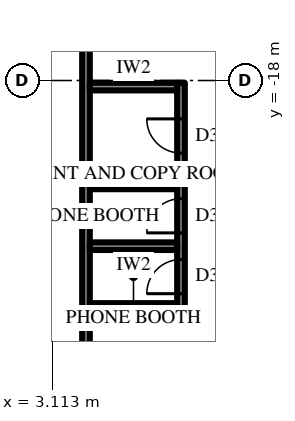
"""IFC4 building model, lengths in metres.
Left out: names, types, materials, properties, quantities, classifications, styles, units other than length and angle.
Written with IfcOpenShell. Run it as: python <this file> out.ifc"""

import sys

from ifc_helpers import new_model, si_unit, direction, frame, frame_2d, origin, place, context, subcontext, project, spatial, rectangle, extrude, element, fill, save


model = new_model("IFC4")
c1 = context("Model", 3, precision=1e-05, world=origin(), true_north=direction((0.0, 1.0)))
c2 = subcontext(c1, "Body", "Model", "MODEL_VIEW")
j1 = project(units=[si_unit("LENGTHUNIT", "METRE"), si_unit("PLANEANGLEUNIT", "RADIAN")], contexts=[c1])
p1 = place(None, origin())
s1 = spatial("IfcSite", under=j1, at=p1, CompositionType="ELEMENT")
p2 = place(p1, origin())
s2 = spatial("IfcBuilding", under=s1, at=p2, CompositionType="ELEMENT")
p3 = place(p2, frame((0.0, 0.0, 90.7)))
s3 = spatial("IfcBuildingStorey", under=s2, at=p3, CompositionType="ELEMENT", Elevation=90.7)
p4 = place(p3, frame((4.0, -14.2, 0.0), z_axis=(0.0, 0.0, 1.0), x_axis=(0.0, -1.0, 0.0)))
e1 = element("IfcWall", 1, at=p4, inside=s3, PredefinedType="PARTITIONING", context=c2, shape_type="SweptSolid", body=[
    extrude(rectangle(XDim=19.6, YDim=0.2, at=frame_2d((9.8, 0.0))), origin(), (0.0, 0.0, 1.0), 4.0),
])
p5 = place(p4, frame((1.46, 0.0, 0.0)))
e2 = element("IfcOpeningElement", 2, at=p5, cuts=e1, PredefinedType="OPENING", context=c2, shape_type="SweptSolid", body=[
    extrude(rectangle(XDim=1.0, YDim=2.2, at=frame_2d((0.5, 1.1))), frame((0.0, 0.11, 0.0), z_axis=(0.0, -1.0, 0.0), x_axis=(1.0, 0.0, 0.0)), (0.0, 0.0, 1.0), 0.22),
])
p6 = place(p3, frame((6.5, -18.06, 0.0), z_axis=(0.0, 0.0, 1.0), x_axis=(0.0, -1.0, 0.0)))
e3 = element("IfcWall", 3, at=p6, inside=s3, PredefinedType="PARTITIONING", context=c2, shape_type="SweptSolid", body=[
    extrude(rectangle(XDim=6.0, YDim=0.2, at=frame_2d((3.0, 0.0))), origin(), (0.0, 0.0, 1.0), 4.0),
])
p7 = place(p6, frame((0.95, 0.0, 0.0)))
e4 = element("IfcOpeningElement", 4, at=p7, cuts=e3, PredefinedType="OPENING", context=c2, shape_type="SweptSolid", body=[
    extrude(rectangle(XDim=0.9, YDim=2.2, at=frame_2d((0.45, 1.1))), frame((0.0, 0.11, 0.0), z_axis=(0.0, -1.0, 0.0), x_axis=(1.0, 0.0, 0.0)), (0.0, 0.0, 1.0), 0.22),
])
p8 = place(p6, frame((3.05, 0.0, 0.0)))
e5 = element("IfcOpeningElement", 5, at=p8, cuts=e3, PredefinedType="OPENING", context=c2, shape_type="SweptSolid", body=[
    extrude(rectangle(XDim=0.9, YDim=2.2, at=frame_2d((0.45, 1.1))), frame((0.0, 0.11, 0.0), z_axis=(0.0, -1.0, 0.0), x_axis=(1.0, 0.0, 0.0)), (0.0, 0.0, 1.0), 0.22),
])
p9 = place(p6, frame((4.65, 0.0, 0.0)))
e6 = element("IfcOpeningElement", 6, at=p9, cuts=e3, PredefinedType="OPENING", context=c2, shape_type="SweptSolid", body=[
    extrude(rectangle(XDim=0.9, YDim=2.2, at=frame_2d((0.45, 1.1))), frame((0.0, 0.11, 0.0), z_axis=(0.0, -1.0, 0.0), x_axis=(1.0, 0.0, 0.0)), (0.0, 0.0, 1.0), 0.22),
])
for number, where, z_axis, x_axis in (
    (7, (4.1, -18.16, 0.0), (0.0, 0.0, 1.0), (1.0, 0.0, 0.0)),
    (8, (4.1, -20.76, 0.0), (0.0, 0.0, 1.0), (1.0, 0.0, 0.0)),
    (9, (4.1, -22.36, 0.0), (0.0, 0.0, 1.0), (1.0, 0.0, 0.0)),
    (10, (4.1, -23.96, 0.0), (0.0, 0.0, 1.0), (1.0, 0.0, 0.0)),
):
    element("IfcWall", number, at=place(p3, frame(where, z_axis=z_axis, x_axis=x_axis)), inside=s3, PredefinedType="PARTITIONING", context=c2, shape_type="SweptSolid", body=[
        extrude(rectangle(XDim=2.3, YDim=0.2, at=frame_2d((1.15, 0.0))), origin(), (0.0, 0.0, 1.0), 4.0),
    ])
p10 = place(p7, frame((0.9, 0.0, 0.0), z_axis=(0.0, 0.0, 1.0), x_axis=(-1.0, 0.0, 0.0)))
e11 = element("IfcDoor", 11, at=p10, inside=s3, OperationType="SINGLE_SWING_LEFT", PredefinedType="DOOR", context=c2, shape_type="SweptSolid", body=[
    extrude(rectangle(XDim=0.9, YDim=2.2, at=frame_2d((0.45, 1.1))), frame((0.0, 0.025, 0.0), z_axis=(0.0, -1.0, 0.0), x_axis=(1.0, 0.0, 0.0)), (0.0, 0.0, 1.0), 0.05),
])
fill(e4, e11)
p11 = place(p8, frame((0.9, 0.0, 0.0), z_axis=(0.0, 0.0, 1.0), x_axis=(-1.0, 0.0, 0.0)))
e12 = element("IfcDoor", 12, at=p11, inside=s3, OperationType="SINGLE_SWING_RIGHT", PredefinedType="DOOR", context=c2, shape_type="SweptSolid", body=[
    extrude(rectangle(XDim=0.9, YDim=2.2, at=frame_2d((0.45, 1.1))), frame((0.0, 0.025, 0.0), z_axis=(0.0, -1.0, 0.0), x_axis=(1.0, 0.0, 0.0)), (0.0, 0.0, 1.0), 0.05),
])
fill(e5, e12)
p12 = place(p9, frame((0.9, 0.0, 0.0), z_axis=(0.0, 0.0, 1.0), x_axis=(-1.0, 0.0, 0.0)))
e13 = element("IfcDoor", 13, at=p12, inside=s3, OperationType="SINGLE_SWING_RIGHT", PredefinedType="DOOR", context=c2, shape_type="SweptSolid", body=[
    extrude(rectangle(XDim=0.9, YDim=2.2, at=frame_2d((0.45, 1.1))), frame((0.0, 0.025, 0.0), z_axis=(0.0, -1.0, 0.0), x_axis=(1.0, 0.0, 0.0)), (0.0, 0.0, 1.0), 0.05),
])
fill(e6, e13)
save(model, sys.argv[1])
